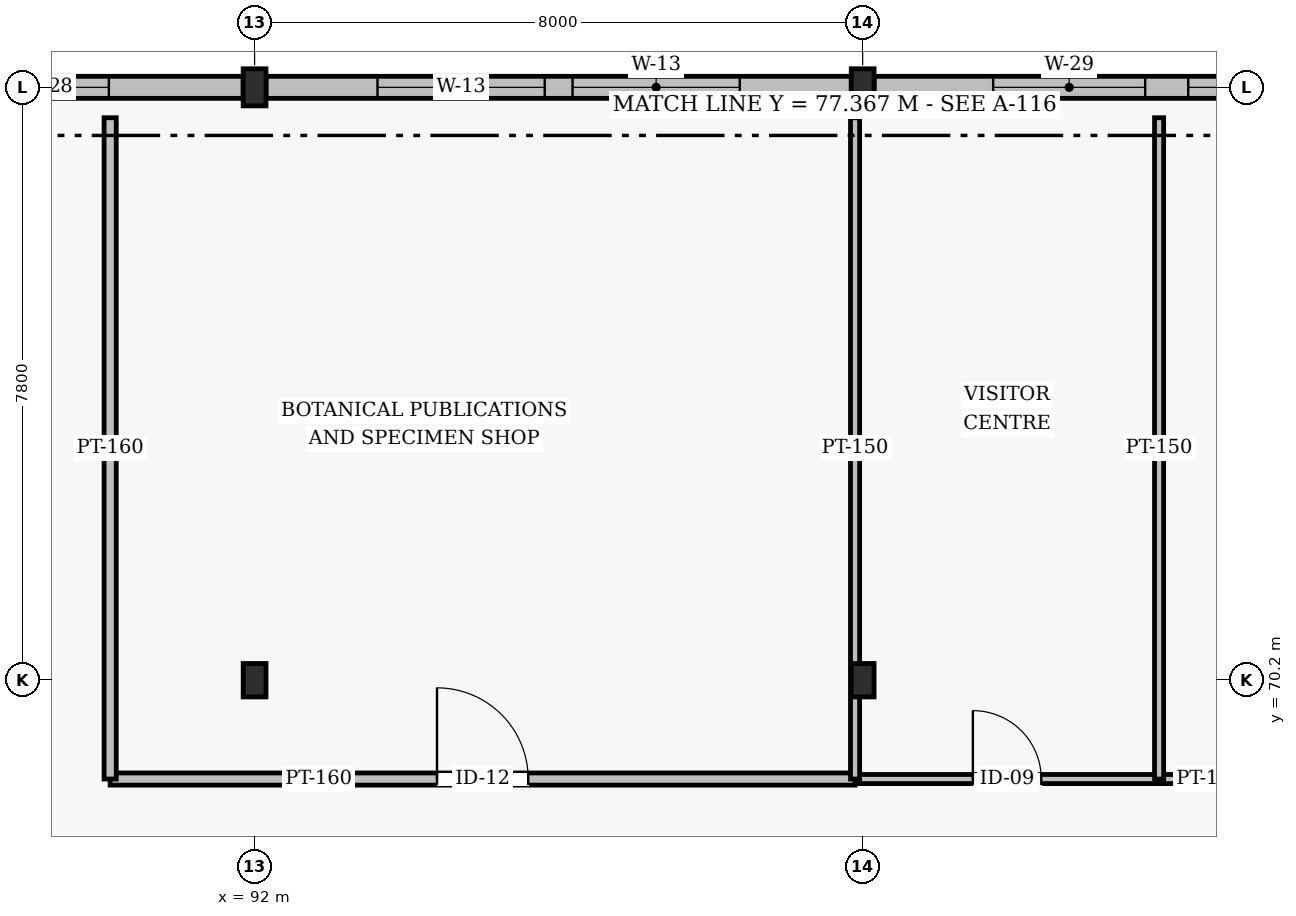
"""IFC4 building model, lengths in metres.
Left out: names, types, materials, properties, quantities, classifications, styles, units other than length and angle.
Written with IfcOpenShell. Run it as: python <this file> out.ifc"""

import sys

from ifc_helpers import new_model, si_unit, direction, frame, frame_2d, origin, origin_2d, place, context, subcontext, project, spatial, rectangle, i_section, extrude, element, fill, save


model = new_model("IFC4")
c1 = context("Model", 3, precision=1e-05, world=origin(), true_north=direction((0.0, 1.0)))
c2 = subcontext(c1, "Body", "Model", "MODEL_VIEW")
j1 = project(units=[si_unit("LENGTHUNIT", "METRE"), si_unit("PLANEANGLEUNIT", "RADIAN")], contexts=[c1])
p1 = place(None, origin())
s1 = spatial("IfcSite", under=j1, at=p1, CompositionType="ELEMENT")
p2 = place(p1, origin())
s2 = spatial("IfcBuilding", under=s1, at=p2, CompositionType="ELEMENT")
p3 = place(p2, origin())
s3 = spatial("IfcBuildingStorey", under=s2, at=p3, CompositionType="ELEMENT", Elevation=0.0)
p4 = place(p3, frame((92.0, 70.2, 0.0), z_axis=(0.0, 0.0, 1.0), x_axis=(1.0, 0.0, 0.0)))
e1 = element("IfcColumn", 1, at=p4, inside=s3, PredefinedType="COLUMN", context=c2, shape_type="SweptSolid", body=[
    extrude(i_section(OverallWidth=0.3, OverallDepth=0.44, WebThickness=0.011, FlangeThickness=0.018, FilletRadius=0.024, at=origin_2d()), origin(), (0.0, 0.0, 1.0), 4.8),
])
p5 = place(p3, frame((92.0, 78.0, 0.0), z_axis=(0.0, 0.0, 1.0), x_axis=(1.0, 0.0, 0.0)))
e2 = element("IfcColumn", 2, at=p5, inside=s3, PredefinedType="COLUMN", context=c2, shape_type="SweptSolid", body=[
    extrude(i_section(OverallWidth=0.3, OverallDepth=0.488, WebThickness=0.011, FlangeThickness=0.018, FilletRadius=0.024, at=origin_2d()), origin(), (0.0, 0.0, 1.0), 4.8),
])
p6 = place(p3, frame((100.0, 70.2, 0.0), z_axis=(0.0, 0.0, 1.0), x_axis=(1.0, 0.0, 0.0)))
e3 = element("IfcColumn", 3, at=p6, inside=s3, PredefinedType="COLUMN", context=c2, shape_type="SweptSolid", body=[
    extrude(i_section(OverallWidth=0.3, OverallDepth=0.44, WebThickness=0.011, FlangeThickness=0.018, FilletRadius=0.024, at=origin_2d()), origin(), (0.0, 0.0, 1.0), 4.8),
])
p7 = place(p3, frame((100.0, 78.0, 0.0), z_axis=(0.0, 0.0, 1.0), x_axis=(1.0, 0.0, 0.0)))
e4 = element("IfcColumn", 4, at=p7, inside=s3, PredefinedType="COLUMN", context=c2, shape_type="SweptSolid", body=[
    extrude(i_section(OverallWidth=0.3, OverallDepth=0.488, WebThickness=0.011, FlangeThickness=0.018, FilletRadius=0.024, at=origin_2d()), origin(), (0.0, 0.0, 1.0), 4.8),
])
p8 = place(p3, frame((107.85, 78.0, 0.0), z_axis=(0.0, 0.0, 1.0), x_axis=(-1.0, 0.0, 0.0)))
e5 = element("IfcWall", 5, at=p8, inside=s3, PredefinedType="SOLIDWALL", context=c2, shape_type="SweptSolid", body=[
    extrude(rectangle(XDim=7.7, YDim=0.29, at=frame_2d((3.85, 0.0))), origin(), (0.0, 0.0, 1.0), 3.868),
])
p9 = place(p8, frame((1.567, 0.0, 0.78)))
e6 = element("IfcOpeningElement", 6, at=p9, cuts=e5, PredefinedType="OPENING", context=c2, shape_type="SweptSolid", body=[
    extrude(rectangle(XDim=2.0, YDim=2.35, at=frame_2d((1.0, 1.175))), frame((0.0, 0.155, 0.0), z_axis=(0.0, -1.0, 0.0), x_axis=(1.0, 0.0, 0.0)), (0.0, 0.0, 1.0), 0.31),
])
p10 = place(p8, frame((4.133, 0.0, 0.78)))
e7 = element("IfcOpeningElement", 7, at=p10, cuts=e5, PredefinedType="OPENING", context=c2, shape_type="SweptSolid", body=[
    extrude(rectangle(XDim=2.0, YDim=2.35, at=frame_2d((1.0, 1.175))), frame((0.0, 0.155, 0.0), z_axis=(0.0, -1.0, 0.0), x_axis=(1.0, 0.0, 0.0)), (0.0, 0.0, 1.0), 0.31),
])
p11 = place(p3, frame((99.85, 78.0, 0.0), z_axis=(0.0, 0.0, 1.0), x_axis=(-1.0, 0.0, 0.0)))
e8 = element("IfcWall", 8, at=p11, inside=s3, PredefinedType="SOLIDWALL", context=c2, shape_type="SweptSolid", body=[
    extrude(rectangle(XDim=7.7, YDim=0.29, at=frame_2d((3.85, 0.0))), origin(), (0.0, 0.0, 1.0), 3.868),
])
p12 = place(p11, frame((1.467, 0.0, 0.75)))
e9 = element("IfcOpeningElement", 9, at=p12, cuts=e8, PredefinedType="OPENING", context=c2, shape_type="SweptSolid", body=[
    extrude(rectangle(XDim=2.2, YDim=2.4, at=frame_2d((1.1, 1.2))), frame((0.0, 0.155, 0.0), z_axis=(0.0, -1.0, 0.0), x_axis=(1.0, 0.0, 0.0)), (0.0, 0.0, 1.0), 0.31),
])
p13 = place(p11, frame((4.033, 0.0, 0.75)))
e10 = element("IfcOpeningElement", 10, at=p13, cuts=e8, PredefinedType="OPENING", context=c2, shape_type="SweptSolid", body=[
    extrude(rectangle(XDim=2.2, YDim=2.4, at=frame_2d((1.1, 1.2))), frame((0.0, 0.155, 0.0), z_axis=(0.0, -1.0, 0.0), x_axis=(1.0, 0.0, 0.0)), (0.0, 0.0, 1.0), 0.31),
])
p14 = place(p3, frame((91.85, 78.0, 0.0), z_axis=(0.0, 0.0, 1.0), x_axis=(-1.0, 0.0, 0.0)))
e11 = element("IfcWall", 11, at=p14, inside=s3, PredefinedType="SOLIDWALL", context=c2, shape_type="SweptSolid", body=[
    extrude(rectangle(XDim=7.7, YDim=0.29, at=frame_2d((3.85, 0.0))), origin(), (0.0, 0.0, 1.0), 3.868),
])
p15 = place(p14, frame((1.767, 0.0, 0.8)))
e12 = element("IfcOpeningElement", 12, at=p15, cuts=e11, PredefinedType="OPENING", context=c2, shape_type="SweptSolid", body=[
    extrude(rectangle(XDim=1.6, YDim=2.3, at=frame_2d((0.8, 1.15))), frame((0.0, 0.155, 0.0), z_axis=(0.0, -1.0, 0.0), x_axis=(1.0, 0.0, 0.0)), (0.0, 0.0, 1.0), 0.31),
])
p16 = place(p14, frame((4.333, 0.0, 0.8)))
e13 = element("IfcOpeningElement", 13, at=p16, cuts=e11, PredefinedType="OPENING", context=c2, shape_type="SweptSolid", body=[
    extrude(rectangle(XDim=1.6, YDim=2.3, at=frame_2d((0.8, 1.15))), frame((0.0, 0.155, 0.0), z_axis=(0.0, -1.0, 0.0), x_axis=(1.0, 0.0, 0.0)), (0.0, 0.0, 1.0), 0.31),
])
p17 = place(p3, frame((90.1, 68.9, 0.0), z_axis=(0.0, 0.0, 1.0), x_axis=(1.0, 0.0, 0.0)))
e14 = element("IfcWall", 14, at=p17, inside=s3, PredefinedType="PARTITIONING", context=c2, shape_type="SweptSolid", body=[
    extrude(rectangle(XDim=9.8, YDim=0.16, at=frame_2d((4.9, 0.0))), origin(), (0.0, 0.0, 1.0), 4.56),
])
p18 = place(p17, frame((4.3, 0.0, 0.0)))
e15 = element("IfcOpeningElement", 15, at=p18, cuts=e14, PredefinedType="OPENING", context=c2, shape_type="SweptSolid", body=[
    extrude(rectangle(XDim=1.2, YDim=2.08, at=frame_2d((0.6, 1.04))), frame((0.0, 0.09, 0.0), z_axis=(0.0, -1.0, 0.0), x_axis=(1.0, 0.0, 0.0)), (0.0, 0.0, 1.0), 0.18),
])
p19 = place(p3, frame((99.9, 68.9, 0.0), z_axis=(0.0, 0.0, 1.0), x_axis=(1.0, 0.0, 0.0)))
e16 = element("IfcWall", 16, at=p19, inside=s3, PredefinedType="PARTITIONING", context=c2, shape_type="SweptSolid", body=[
    extrude(rectangle(XDim=4.0, YDim=0.12, at=frame_2d((2.0, 0.0))), origin(), (0.0, 0.0, 1.0), 4.22),
])
p20 = place(p19, frame((1.55, 0.0, 0.0)))
e17 = element("IfcOpeningElement", 17, at=p20, cuts=e16, PredefinedType="OPENING", context=c2, shape_type="SweptSolid", body=[
    extrude(rectangle(XDim=0.9, YDim=2.1, at=frame_2d((0.45, 1.05))), frame((0.0, 0.07, 0.0), z_axis=(0.0, -1.0, 0.0), x_axis=(1.0, 0.0, 0.0)), (0.0, 0.0, 1.0), 0.14),
])
p21 = place(p3, frame((103.9, 68.9, 0.0), z_axis=(0.0, 0.0, 1.0), x_axis=(1.0, 0.0, 0.0)))
e18 = element("IfcWall", 18, at=p21, inside=s3, PredefinedType="PARTITIONING", context=c2, shape_type="SweptSolid", body=[
    extrude(rectangle(XDim=3.7, YDim=0.12, at=frame_2d((1.85, 0.0))), origin(), (0.0, 0.0, 1.0), 4.56),
])
p22 = place(p21, frame((1.35, 0.0, 0.0)))
e19 = element("IfcOpeningElement", 19, at=p22, cuts=e18, PredefinedType="OPENING", context=c2, shape_type="SweptSolid", body=[
    extrude(rectangle(XDim=1.0, YDim=2.1, at=frame_2d((0.5, 1.05))), frame((0.0, 0.07, 0.0), z_axis=(0.0, -1.0, 0.0), x_axis=(1.0, 0.0, 0.0)), (0.0, 0.0, 1.0), 0.14),
])
p23 = place(p3, frame((90.1, 68.9, 0.0), z_axis=(0.0, 0.0, 1.0), x_axis=(0.0, 1.0, 0.0)))
e20 = element("IfcWall", 20, at=p23, inside=s3, PredefinedType="PARTITIONING", context=c2, shape_type="SweptSolid", body=[
    extrude(rectangle(XDim=8.7, YDim=0.16, at=frame_2d((4.35, 0.0))), origin(), (0.0, 0.0, 1.0), 4.06),
])
for number, where, z_axis, x_axis in (
    (21, (99.9, 68.9, 0.0), (0.0, 0.0, 1.0), (0.0, 1.0, 0.0)),
    (22, (103.9, 68.9, 0.0), (0.0, 0.0, 1.0), (0.0, 1.0, 0.0)),
):
    element("IfcWall", number, at=place(p3, frame(where, z_axis=z_axis, x_axis=x_axis)), inside=s3, PredefinedType="PARTITIONING", context=c2, shape_type="SweptSolid", body=[
        extrude(rectangle(XDim=8.7, YDim=0.12, at=frame_2d((4.35, 0.0))), origin(), (0.0, 0.0, 1.0), 4.06),
    ])
p24 = place(p9, origin())
e23 = element("IfcWindow", 23, at=p24, inside=s3, PartitioningType="SINGLE_PANEL", PredefinedType="WINDOW", context=c2, shape_type="SweptSolid", body=[
    extrude(rectangle(XDim=2.0, YDim=2.35, at=frame_2d((1.0, 1.175))), frame((0.0, 0.03, 0.0), z_axis=(0.0, -1.0, 0.0), x_axis=(1.0, 0.0, 0.0)), (0.0, 0.0, 1.0), 0.06),
])
fill(e6, e23)
p25 = place(p10, origin())
e24 = element("IfcWindow", 24, at=p25, inside=s3, PartitioningType="SINGLE_PANEL", PredefinedType="WINDOW", context=c2, shape_type="SweptSolid", body=[
    extrude(rectangle(XDim=2.0, YDim=2.35, at=frame_2d((1.0, 1.175))), frame((0.0, 0.03, 0.0), z_axis=(0.0, -1.0, 0.0), x_axis=(1.0, 0.0, 0.0)), (0.0, 0.0, 1.0), 0.06),
])
fill(e7, e24)
p26 = place(p12, origin())
e25 = element("IfcWindow", 25, at=p26, inside=s3, PartitioningType="SINGLE_PANEL", PredefinedType="WINDOW", context=c2, shape_type="SweptSolid", body=[
    extrude(rectangle(XDim=2.2, YDim=2.4, at=frame_2d((1.1, 1.2))), frame((0.0, 0.03, 0.0), z_axis=(0.0, -1.0, 0.0), x_axis=(1.0, 0.0, 0.0)), (0.0, 0.0, 1.0), 0.06),
])
fill(e9, e25)
p27 = place(p13, origin())
e26 = element("IfcWindow", 26, at=p27, inside=s3, PartitioningType="SINGLE_PANEL", PredefinedType="WINDOW", context=c2, shape_type="SweptSolid", body=[
    extrude(rectangle(XDim=2.2, YDim=2.4, at=frame_2d((1.1, 1.2))), frame((0.0, 0.03, 0.0), z_axis=(0.0, -1.0, 0.0), x_axis=(1.0, 0.0, 0.0)), (0.0, 0.0, 1.0), 0.06),
])
fill(e10, e26)
p28 = place(p15, origin())
e27 = element("IfcWindow", 27, at=p28, inside=s3, PartitioningType="SINGLE_PANEL", PredefinedType="WINDOW", context=c2, shape_type="SweptSolid", body=[
    extrude(rectangle(XDim=1.6, YDim=2.3, at=frame_2d((0.8, 1.15))), frame((0.0, 0.03, 0.0), z_axis=(0.0, -1.0, 0.0), x_axis=(1.0, 0.0, 0.0)), (0.0, 0.0, 1.0), 0.06),
])
fill(e12, e27)
p29 = place(p18, origin())
e28 = element("IfcDoor", 28, at=p29, inside=s3, OperationType="SINGLE_SWING_LEFT", PredefinedType="DOOR", context=c2, shape_type="SweptSolid", body=[
    extrude(rectangle(XDim=1.2, YDim=2.08, at=frame_2d((0.6, 1.04))), frame((0.0, 0.025, 0.0), z_axis=(0.0, -1.0, 0.0), x_axis=(1.0, 0.0, 0.0)), (0.0, 0.0, 1.0), 0.05),
])
fill(e15, e28)
p30 = place(p20, origin())
e29 = element("IfcDoor", 29, at=p30, inside=s3, OperationType="SINGLE_SWING_LEFT", PredefinedType="DOOR", context=c2, shape_type="SweptSolid", body=[
    extrude(rectangle(XDim=0.9, YDim=2.1, at=frame_2d((0.45, 1.05))), frame((0.0, 0.025, 0.0), z_axis=(0.0, -1.0, 0.0), x_axis=(1.0, 0.0, 0.0)), (0.0, 0.0, 1.0), 0.05),
])
fill(e17, e29)
save(model, sys.argv[1])
